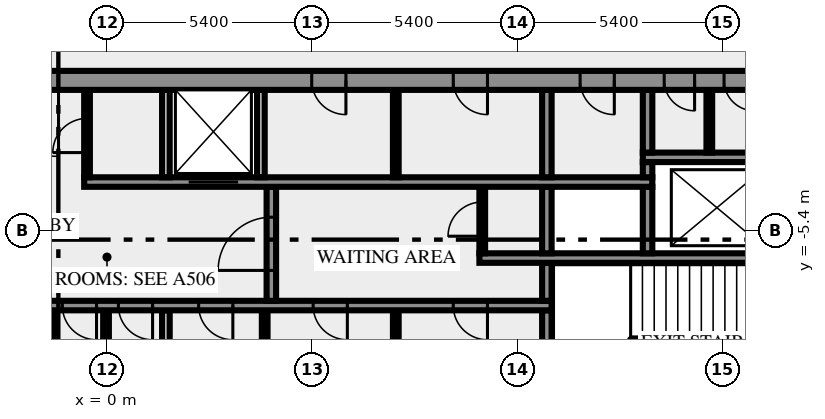
"""IFC4 building model, lengths in metres.
Left out: names, types, materials, properties, quantities, classifications, styles, units other than length and angle.
Written with IfcOpenShell. Run it as: python <this file> out.ifc"""

import sys

from ifc_helpers import new_model, si_unit, direction, frame, frame_2d, origin, place, context, subcontext, project, spatial, rectangle, extrude, element, fill, save


model = new_model("IFC4")
c1 = context("Model", 3, precision=1e-05, world=origin(), true_north=direction((0.0, 1.0)))
c2 = subcontext(c1, "Body", "Model", "MODEL_VIEW")
j1 = project(units=[si_unit("LENGTHUNIT", "METRE"), si_unit("PLANEANGLEUNIT", "RADIAN")], contexts=[c1])
p1 = place(None, origin())
s1 = spatial("IfcSite", under=j1, at=p1, CompositionType="ELEMENT")
p2 = place(p1, origin())
s2 = spatial("IfcBuilding", under=s1, at=p2, CompositionType="ELEMENT")
p3 = place(p2, frame((0.0, 0.0, 257.0)))
s3 = spatial("IfcBuildingStorey", under=s2, at=p3, CompositionType="ELEMENT", Elevation=257.0)
for number, where, z_axis, x_axis in (
    (1, (-1.425, -10.5, 0.0), (0.0, 0.0, 1.0), (0.0, 1.0, 0.0)),
    (2, (-0.025, -10.5, 0.0), (0.0, 0.0, 1.0), (0.0, 1.0, 0.0)),
):
    element("IfcWall", number, at=place(p3, frame(where, z_axis=z_axis, x_axis=x_axis)), inside=s3, PredefinedType="PARTITIONING", context=c2, shape_type="SweptSolid", body=[
        extrude(rectangle(XDim=3.0, YDim=0.15, at=frame_2d((1.5, 0.0))), origin(), (0.0, 0.0, 1.0), 3.65),
    ])
p4 = place(p3, frame((1.55, -10.5, 0.0), z_axis=(0.0, 0.0, 1.0), x_axis=(0.0, 1.0, 0.0)))
e3 = element("IfcWall", 3, at=p4, inside=s3, PredefinedType="SOLIDWALL", context=c2, shape_type="SweptSolid", body=[
    extrude(rectangle(XDim=3.0, YDim=0.2, at=frame_2d((1.5, 0.0))), origin(), (0.0, 0.0, 1.0), 3.65),
])
for number, where, z_axis, x_axis in (
    (4, (4.15, -10.5, 0.0), (0.0, 0.0, 1.0), (0.0, 1.0, 0.0)),
    (5, (7.6, -10.5, 0.0), (0.0, 0.0, 1.0), (0.0, 1.0, 0.0)),
):
    element("IfcWall", number, at=place(p3, frame(where, z_axis=z_axis, x_axis=x_axis)), inside=s3, PredefinedType="PARTITIONING", context=c2, shape_type="SweptSolid", body=[
        extrude(rectangle(XDim=3.0, YDim=0.15, at=frame_2d((1.5, 0.0))), origin(), (0.0, 0.0, 1.0), 3.65),
    ])
p5 = place(p3, frame((11.575, -10.5, 0.0), z_axis=(0.0, 0.0, 1.0), x_axis=(0.0, 1.0, 0.0)))
e6 = element("IfcWall", 6, at=p5, inside=s3, PredefinedType="SHEAR", context=c2, shape_type="SweptSolid", body=[
    extrude(rectangle(XDim=3.0, YDim=0.25, at=frame_2d((1.5, 0.0))), origin(), (0.0, 0.0, 1.0), 3.65),
])
p6 = place(p3, frame((11.7, -7.375, 0.0), z_axis=(0.0, 0.0, 1.0), x_axis=(-1.0, 0.0, 0.0)))
e7 = element("IfcWall", 7, at=p6, inside=s3, PredefinedType="SHEAR", context=c2, shape_type="SweptSolid", body=[
    extrude(rectangle(XDim=23.4, YDim=0.25, at=frame_2d((11.7, 0.0))), origin(), (0.0, 0.0, 1.0), 3.65),
])
p7 = place(p6, frame((22.225, 0.0, 0.0)))
e8 = element("IfcOpeningElement", 8, at=p7, cuts=e7, PredefinedType="OPENING", context=c2, shape_type="SweptSolid", body=[
    extrude(rectangle(XDim=0.8, YDim=2.1, at=frame_2d((0.4, 1.05))), frame((0.0, 0.135, 0.0), z_axis=(0.0, -1.0, 0.0), x_axis=(1.0, 0.0, 0.0)), (0.0, 0.0, 1.0), 0.27),
])
p8 = place(p6, frame((20.2, 0.0, 0.0)))
e9 = element("IfcOpeningElement", 9, at=p8, cuts=e7, PredefinedType="OPENING", context=c2, shape_type="SweptSolid", body=[
    extrude(rectangle(XDim=1.1, YDim=2.1, at=frame_2d((0.55, 1.05))), frame((0.0, 0.135, 0.0), z_axis=(0.0, -1.0, 0.0), x_axis=(1.0, 0.0, 0.0)), (0.0, 0.0, 1.0), 0.27),
])
p9 = place(p6, frame((17.7, 0.0, 0.0)))
e10 = element("IfcOpeningElement", 10, at=p9, cuts=e7, PredefinedType="OPENING", context=c2, shape_type="SweptSolid", body=[
    extrude(rectangle(XDim=1.1, YDim=2.1, at=frame_2d((0.55, 1.05))), frame((0.0, 0.135, 0.0), z_axis=(0.0, -1.0, 0.0), x_axis=(1.0, 0.0, 0.0)), (0.0, 0.0, 1.0), 0.27),
])
p10 = place(p6, frame((15.975, 0.0, 0.0)))
e11 = element("IfcOpeningElement", 11, at=p10, cuts=e7, PredefinedType="OPENING", context=c2, shape_type="SweptSolid", body=[
    extrude(rectangle(XDim=0.8, YDim=2.1, at=frame_2d((0.4, 1.05))), frame((0.0, 0.135, 0.0), z_axis=(0.0, -1.0, 0.0), x_axis=(1.0, 0.0, 0.0)), (0.0, 0.0, 1.0), 0.27),
])
p11 = place(p6, frame((14.75, 0.0, 0.0)))
e12 = element("IfcOpeningElement", 12, at=p11, cuts=e7, PredefinedType="OPENING", context=c2, shape_type="SweptSolid", body=[
    extrude(rectangle(XDim=0.7, YDim=2.1, at=frame_2d((0.35, 1.05))), frame((0.0, 0.135, 0.0), z_axis=(0.0, -1.0, 0.0), x_axis=(1.0, 0.0, 0.0)), (0.0, 0.0, 1.0), 0.27),
])
p12 = place(p6, frame((13.35, 0.0, 0.0)))
e13 = element("IfcOpeningElement", 13, at=p12, cuts=e7, PredefinedType="OPENING", context=c2, shape_type="SweptSolid", body=[
    extrude(rectangle(XDim=0.9, YDim=2.1, at=frame_2d((0.45, 1.05))), frame((0.0, 0.135, 0.0), z_axis=(0.0, -1.0, 0.0), x_axis=(1.0, 0.0, 0.0)), (0.0, 0.0, 1.0), 0.27),
])
p13 = place(p6, frame((11.975, 0.0, 0.0)))
e14 = element("IfcOpeningElement", 14, at=p13, cuts=e7, PredefinedType="OPENING", context=c2, shape_type="SweptSolid", body=[
    extrude(rectangle(XDim=0.9, YDim=2.1, at=frame_2d((0.45, 1.05))), frame((0.0, 0.135, 0.0), z_axis=(0.0, -1.0, 0.0), x_axis=(1.0, 0.0, 0.0)), (0.0, 0.0, 1.0), 0.27),
])
p14 = place(p6, frame((10.5, 0.0, 0.0)))
e15 = element("IfcOpeningElement", 15, at=p14, cuts=e7, PredefinedType="OPENING", context=c2, shape_type="SweptSolid", body=[
    extrude(rectangle(XDim=0.9, YDim=2.1, at=frame_2d((0.45, 1.05))), frame((0.0, 0.135, 0.0), z_axis=(0.0, -1.0, 0.0), x_axis=(1.0, 0.0, 0.0)), (0.0, 0.0, 1.0), 0.27),
])
p15 = place(p6, frame((8.388, 0.0, 0.0)))
e16 = element("IfcOpeningElement", 16, at=p15, cuts=e7, PredefinedType="OPENING", context=c2, shape_type="SweptSolid", body=[
    extrude(rectangle(XDim=0.9, YDim=2.1, at=frame_2d((0.45, 1.05))), frame((0.0, 0.135, 0.0), z_axis=(0.0, -1.0, 0.0), x_axis=(1.0, 0.0, 0.0)), (0.0, 0.0, 1.0), 0.27),
])
p16 = place(p6, frame((5.375, 0.0, 0.0)))
e17 = element("IfcOpeningElement", 17, at=p16, cuts=e7, PredefinedType="OPENING", context=c2, shape_type="SweptSolid", body=[
    extrude(rectangle(XDim=0.9, YDim=2.1, at=frame_2d((0.45, 1.05))), frame((0.0, 0.135, 0.0), z_axis=(0.0, -1.0, 0.0), x_axis=(1.0, 0.0, 0.0)), (0.0, 0.0, 1.0), 0.27),
])
p17 = place(p6, frame((1.688, 0.0, 0.0)))
e18 = element("IfcOpeningElement", 18, at=p17, cuts=e7, PredefinedType="OPENING", context=c2, shape_type="SweptSolid", body=[
    extrude(rectangle(XDim=0.9, YDim=2.1, at=frame_2d((0.45, 1.05))), frame((0.0, 0.135, 0.0), z_axis=(0.0, -1.0, 0.0), x_axis=(1.0, 0.0, 0.0)), (0.0, 0.0, 1.0), 0.27),
])
p18 = place(p3, frame((4.325, -7.25, 0.0), z_axis=(0.0, 0.0, 1.0), x_axis=(0.0, 1.0, 0.0)))
e19 = element("IfcWall", 19, at=p18, inside=s3, PredefinedType="SHEAR", context=c2, shape_type="SweptSolid", body=[
    extrude(rectangle(XDim=3.0, YDim=0.25, at=frame_2d((1.5, 0.0))), origin(), (0.0, 0.0, 1.0), 3.65),
])
p19 = place(p18, frame((0.8, 0.0, 0.0)))
e20 = element("IfcOpeningElement", 20, at=p19, cuts=e19, PredefinedType="OPENING", context=c2, shape_type="SweptSolid", body=[
    extrude(rectangle(XDim=1.4, YDim=2.1, at=frame_2d((0.7, 1.05))), frame((0.0, 0.135, 0.0), z_axis=(0.0, -1.0, 0.0), x_axis=(1.0, 0.0, 0.0)), (0.0, 0.0, 1.0), 0.27),
])
p20 = place(p3, frame((11.575, -7.25, 0.0), z_axis=(0.0, 0.0, 1.0), x_axis=(0.0, 1.0, 0.0)))
e21 = element("IfcWall", 21, at=p20, inside=s3, PredefinedType="SHEAR", context=c2, shape_type="SweptSolid", body=[
    extrude(rectangle(XDim=1.0, YDim=0.25, at=frame_2d((0.5, 0.0))), origin(), (0.0, 0.0, 1.0), 3.65),
])
p21 = place(p3, frame((20.0, -6.125, 0.0), z_axis=(0.0, 0.0, 1.0), x_axis=(-1.0, 0.0, 0.0)))
e22 = element("IfcWall", 22, at=p21, inside=s3, PredefinedType="SHEAR", context=c2, shape_type="SweptSolid", body=[
    extrude(rectangle(XDim=10.2, YDim=0.25, at=frame_2d((5.1, 0.0))), origin(), (0.0, 0.0, 1.0), 3.65),
])
p22 = place(p21, frame((0.55, 0.0, 0.0)))
e23 = element("IfcOpeningElement", 23, at=p22, cuts=e22, PredefinedType="OPENING", context=c2, shape_type="SweptSolid", body=[
    extrude(rectangle(XDim=1.8, YDim=2.1, at=frame_2d((0.9, 1.05))), frame((0.0, 0.135, 0.0), z_axis=(0.0, -1.0, 0.0), x_axis=(1.0, 0.0, 0.0)), (0.0, 0.0, 1.0), 0.27),
])
p23 = place(p3, frame((9.875, -6.0, 0.0), z_axis=(0.0, 0.0, 1.0), x_axis=(0.0, 1.0, 0.0)))
e24 = element("IfcWall", 24, at=p23, inside=s3, PredefinedType="PARTITIONING", context=c2, shape_type="SweptSolid", body=[
    extrude(rectangle(XDim=1.75, YDim=0.15, at=frame_2d((0.875, 0.0))), origin(), (0.0, 0.0, 1.0), 3.65),
])
p24 = place(p23, frame((0.45, 0.0, 0.0)))
e25 = element("IfcOpeningElement", 25, at=p24, cuts=e24, PredefinedType="OPENING", context=c2, shape_type="SweptSolid", body=[
    extrude(rectangle(XDim=0.9, YDim=2.1, at=frame_2d((0.45, 1.05))), frame((0.0, 0.085, 0.0), z_axis=(0.0, -1.0, 0.0), x_axis=(1.0, 0.0, 0.0)), (0.0, 0.0, 1.0), 0.17),
])
for number, where, z_axis, x_axis in (
    (26, (11.575, -6.0, 0.0), (0.0, 0.0, 1.0), (0.0, 1.0, 0.0)),
    (27, (14.225, -6.0, 0.0), (0.0, 0.0, 1.0), (0.0, 1.0, 0.0)),
):
    element("IfcWall", number, at=place(p3, frame(where, z_axis=z_axis, x_axis=x_axis)), inside=s3, PredefinedType="SHEAR", context=c2, shape_type="SweptSolid", body=[
        extrude(rectangle(XDim=1.75, YDim=0.25, at=frame_2d((0.875, 0.0))), origin(), (0.0, 0.0, 1.0), 3.65),
    ])
p25 = place(p3, frame((-0.6, -4.125, 0.0), z_axis=(0.0, 0.0, 1.0), x_axis=(1.0, 0.0, 0.0)))
e28 = element("IfcWall", 28, at=p25, inside=s3, PredefinedType="SHEAR", context=c2, shape_type="SweptSolid", body=[
    extrude(rectangle(XDim=14.95, YDim=0.25, at=frame_2d((7.475, 0.0))), origin(), (0.0, 0.0, 1.0), 3.65),
])
p26 = place(p25, frame((2.75, 0.0, 0.0)))
e29 = element("IfcOpeningElement", 29, at=p26, cuts=e28, PredefinedType="OPENING", context=c2, shape_type="SweptSolid", body=[
    extrude(rectangle(XDim=1.3, YDim=2.1, at=frame_2d((0.65, 1.05))), frame((0.0, 0.135, 0.0), z_axis=(0.0, -1.0, 0.0), x_axis=(1.0, 0.0, 0.0)), (0.0, 0.0, 1.0), 0.27),
])
p27 = place(p3, frame((-0.525, -4.0, 0.0), z_axis=(0.0, 0.0, 1.0), x_axis=(0.0, 1.0, 0.0)))
e30 = element("IfcWall", 30, at=p27, inside=s3, PredefinedType="PARTITIONING", context=c2, shape_type="SweptSolid", body=[
    extrude(rectangle(XDim=2.3, YDim=0.15, at=frame_2d((1.15, 0.0))), origin(), (0.0, 0.0, 1.0), 3.65),
])
p28 = place(p27, frame((0.65, 0.0, 0.0)))
e31 = element("IfcOpeningElement", 31, at=p28, cuts=e30, PredefinedType="OPENING", context=c2, shape_type="SweptSolid", body=[
    extrude(rectangle(XDim=0.9, YDim=2.1, at=frame_2d((0.45, 1.05))), frame((0.0, 0.085, 0.0), z_axis=(0.0, -1.0, 0.0), x_axis=(1.0, 0.0, 0.0)), (0.0, 0.0, 1.0), 0.17),
])
for number, where, z_axis, x_axis in (
    (32, (1.55, -4.0, 0.0), (0.0, 0.0, 1.0), (0.0, 1.0, 0.0)),
    (33, (4.05, -4.0, 0.0), (0.0, 0.0, 1.0), (0.0, 1.0, 0.0)),
):
    element("IfcWall", number, at=place(p3, frame(where, z_axis=z_axis, x_axis=x_axis)), inside=s3, PredefinedType="SOLIDWALL", context=c2, shape_type="SweptSolid", body=[
        extrude(rectangle(XDim=2.3, YDim=0.2, at=frame_2d((1.15, 0.0))), origin(), (0.0, 0.0, 1.0), 3.65),
    ])
p29 = place(p3, frame((7.6, -4.0, 0.0), z_axis=(0.0, 0.0, 1.0), x_axis=(0.0, 1.0, 0.0)))
e34 = element("IfcWall", 34, at=p29, inside=s3, PredefinedType="PARTITIONING", context=c2, shape_type="SweptSolid", body=[
    extrude(rectangle(XDim=2.3, YDim=0.15, at=frame_2d((1.15, 0.0))), origin(), (0.0, 0.0, 1.0), 3.65),
])
p30 = place(p3, frame((11.575, -4.0, 0.0), z_axis=(0.0, 0.0, 1.0), x_axis=(0.0, 1.0, 0.0)))
e35 = element("IfcWall", 35, at=p30, inside=s3, PredefinedType="SHEAR", context=c2, shape_type="SweptSolid", body=[
    extrude(rectangle(XDim=2.3, YDim=0.25, at=frame_2d((1.15, 0.0))), origin(), (0.0, 0.0, 1.0), 3.65),
])
p31 = place(p3, frame((14.225, -4.0, 0.0), z_axis=(0.0, 0.0, 1.0), x_axis=(0.0, 1.0, 0.0)))
e36 = element("IfcWall", 36, at=p31, inside=s3, PredefinedType="SHEAR", context=c2, shape_type="SweptSolid", body=[
    extrude(rectangle(XDim=0.4, YDim=0.25, at=frame_2d((0.2, 0.0))), origin(), (0.0, 0.0, 1.0), 3.65),
])
p32 = place(p3, frame((14.1, -3.475, 0.0), z_axis=(0.0, 0.0, 1.0), x_axis=(1.0, 0.0, 0.0)))
e37 = element("IfcWall", 37, at=p32, inside=s3, PredefinedType="SHEAR", context=c2, shape_type="SweptSolid", body=[
    extrude(rectangle(XDim=3.25, YDim=0.25, at=frame_2d((1.625, 0.0))), origin(), (0.0, 0.0, 1.0), 3.65),
])
p33 = place(p3, frame((14.225, -3.35, 0.0), z_axis=(0.0, 0.0, 1.0), x_axis=(0.0, 1.0, 0.0)))
e38 = element("IfcWall", 38, at=p33, inside=s3, PredefinedType="SHEAR", context=c2, shape_type="SweptSolid", body=[
    extrude(rectangle(XDim=1.65, YDim=0.25, at=frame_2d((0.825, 0.0))), origin(), (0.0, 0.0, 1.0), 3.65),
])
p34 = place(p3, frame((15.85, -3.35, 0.0), z_axis=(0.0, 0.0, 1.0), x_axis=(0.0, 1.0, 0.0)))
e39 = element("IfcWall", 39, at=p34, inside=s3, PredefinedType="PARTITIONING", context=c2, shape_type="SweptSolid", body=[
    extrude(rectangle(XDim=1.65, YDim=0.15, at=frame_2d((0.825, 0.0))), origin(), (0.0, 0.0, 1.0), 3.65),
])
p35 = place(p3, frame((20.49, -1.45, 0.0), z_axis=(0.0, 0.0, 1.0), x_axis=(-1.0, 0.0, 0.0)))
e40 = element("IfcWall", 40, at=p35, inside=s3, PredefinedType="SHEAR", context=c2, shape_type="SweptSolid", body=[
    extrude(rectangle(XDim=40.98, YDim=0.5, at=frame_2d((20.49, 0.0))), origin(), (0.0, 0.0, 1.0), 3.65),
])
p36 = place(p35, frame((38.14, 0.0, 0.0)))
e41 = element("IfcOpeningElement", 41, at=p36, cuts=e40, PredefinedType="OPENING", context=c2, shape_type="SweptSolid", body=[
    extrude(rectangle(XDim=1.8, YDim=2.1, at=frame_2d((0.9, 1.05))), frame((0.0, 0.26, 0.0), z_axis=(0.0, -1.0, 0.0), x_axis=(1.0, 0.0, 0.0)), (0.0, 0.0, 1.0), 0.52),
])
p37 = place(p35, frame((35.89, 0.0, 0.0)))
e42 = element("IfcOpeningElement", 42, at=p37, cuts=e40, PredefinedType="OPENING", context=c2, shape_type="SweptSolid", body=[
    extrude(rectangle(XDim=0.9, YDim=2.1, at=frame_2d((0.45, 1.05))), frame((0.0, 0.26, 0.0), z_axis=(0.0, -1.0, 0.0), x_axis=(1.0, 0.0, 0.0)), (0.0, 0.0, 1.0), 0.52),
])
p38 = place(p35, frame((32.94, 0.0, 0.0)))
e43 = element("IfcOpeningElement", 43, at=p38, cuts=e40, PredefinedType="OPENING", context=c2, shape_type="SweptSolid", body=[
    extrude(rectangle(XDim=0.9, YDim=2.1, at=frame_2d((0.45, 1.05))), frame((0.0, 0.26, 0.0), z_axis=(0.0, -1.0, 0.0), x_axis=(1.0, 0.0, 0.0)), (0.0, 0.0, 1.0), 0.52),
])
p39 = place(p35, frame((31.015, 0.0, 0.0)))
e44 = element("IfcOpeningElement", 44, at=p39, cuts=e40, PredefinedType="OPENING", context=c2, shape_type="SweptSolid", body=[
    extrude(rectangle(XDim=0.8, YDim=2.1, at=frame_2d((0.4, 1.05))), frame((0.0, 0.26, 0.0), z_axis=(0.0, -1.0, 0.0), x_axis=(1.0, 0.0, 0.0)), (0.0, 0.0, 1.0), 0.52),
])
p40 = place(p35, frame((24.765, 0.0, 0.0)))
e45 = element("IfcOpeningElement", 45, at=p40, cuts=e40, PredefinedType="OPENING", context=c2, shape_type="SweptSolid", body=[
    extrude(rectangle(XDim=0.8, YDim=2.1, at=frame_2d((0.4, 1.05))), frame((0.0, 0.26, 0.0), z_axis=(0.0, -1.0, 0.0), x_axis=(1.0, 0.0, 0.0)), (0.0, 0.0, 1.0), 0.52),
])
p41 = place(p35, frame((21.765, 0.0, 0.0)))
e46 = element("IfcOpeningElement", 46, at=p41, cuts=e40, PredefinedType="OPENING", context=c2, shape_type="SweptSolid", body=[
    extrude(rectangle(XDim=2.0, YDim=2.1, at=frame_2d((1.0, 1.05))), frame((0.0, 0.26, 0.0), z_axis=(0.0, -1.0, 0.0), x_axis=(1.0, 0.0, 0.0)), (0.0, 0.0, 1.0), 0.52),
])
p42 = place(p35, frame((14.202, 0.0, 0.0)))
e47 = element("IfcOpeningElement", 47, at=p42, cuts=e40, PredefinedType="OPENING", context=c2, shape_type="SweptSolid", body=[
    extrude(rectangle(XDim=0.9, YDim=2.1, at=frame_2d((0.45, 1.05))), frame((0.0, 0.26, 0.0), z_axis=(0.0, -1.0, 0.0), x_axis=(1.0, 0.0, 0.0)), (0.0, 0.0, 1.0), 0.52),
])
p43 = place(p35, frame((10.478, 0.0, 0.0)))
e48 = element("IfcOpeningElement", 48, at=p43, cuts=e40, PredefinedType="OPENING", context=c2, shape_type="SweptSolid", body=[
    extrude(rectangle(XDim=0.9, YDim=2.1, at=frame_2d((0.45, 1.05))), frame((0.0, 0.26, 0.0), z_axis=(0.0, -1.0, 0.0), x_axis=(1.0, 0.0, 0.0)), (0.0, 0.0, 1.0), 0.52),
])
p44 = place(p35, frame((7.14, 0.0, 0.0)))
e49 = element("IfcOpeningElement", 49, at=p44, cuts=e40, PredefinedType="OPENING", context=c2, shape_type="SweptSolid", body=[
    extrude(rectangle(XDim=0.9, YDim=2.1, at=frame_2d((0.45, 1.05))), frame((0.0, 0.26, 0.0), z_axis=(0.0, -1.0, 0.0), x_axis=(1.0, 0.0, 0.0)), (0.0, 0.0, 1.0), 0.52),
])
p45 = place(p35, frame((5.028, 0.0, 0.0)))
e50 = element("IfcOpeningElement", 50, at=p45, cuts=e40, PredefinedType="OPENING", context=c2, shape_type="SweptSolid", body=[
    extrude(rectangle(XDim=0.8, YDim=2.1, at=frame_2d((0.4, 1.05))), frame((0.0, 0.26, 0.0), z_axis=(0.0, -1.0, 0.0), x_axis=(1.0, 0.0, 0.0)), (0.0, 0.0, 1.0), 0.52),
])
p46 = place(p35, frame((3.452, 0.0, 0.0)))
e51 = element("IfcOpeningElement", 51, at=p46, cuts=e40, PredefinedType="OPENING", context=c2, shape_type="SweptSolid", body=[
    extrude(rectangle(XDim=0.8, YDim=2.1, at=frame_2d((0.4, 1.05))), frame((0.0, 0.26, 0.0), z_axis=(0.0, -1.0, 0.0), x_axis=(1.0, 0.0, 0.0)), (0.0, 0.0, 1.0), 0.52),
])
p47 = place(p35, frame((1.04, 0.0, 0.0)))
e52 = element("IfcOpeningElement", 52, at=p47, cuts=e40, PredefinedType="OPENING", context=c2, shape_type="SweptSolid", body=[
    extrude(rectangle(XDim=1.8, YDim=2.1, at=frame_2d((0.9, 1.05))), frame((0.0, 0.26, 0.0), z_axis=(0.0, -1.0, 0.0), x_axis=(1.0, 0.0, 0.0)), (0.0, 0.0, 1.0), 0.52),
])
p48 = place(p13, origin())
e53 = element("IfcDoor", 53, at=p48, inside=s3, OperationType="SINGLE_SWING_RIGHT", PredefinedType="DOOR", context=c2, shape_type="SweptSolid", body=[
    extrude(rectangle(XDim=0.9, YDim=2.1, at=frame_2d((0.45, 1.05))), frame((0.0, 0.025, 0.0), z_axis=(0.0, -1.0, 0.0), x_axis=(1.0, 0.0, 0.0)), (0.0, 0.0, 1.0), 0.05),
])
fill(e14, e53)
p49 = place(p14, origin())
e54 = element("IfcDoor", 54, at=p49, inside=s3, OperationType="SINGLE_SWING_LEFT", PredefinedType="DOOR", context=c2, shape_type="SweptSolid", body=[
    extrude(rectangle(XDim=0.9, YDim=2.1, at=frame_2d((0.45, 1.05))), frame((0.0, 0.025, 0.0), z_axis=(0.0, -1.0, 0.0), x_axis=(1.0, 0.0, 0.0)), (0.0, 0.0, 1.0), 0.05),
])
fill(e15, e54)
p50 = place(p15, origin())
e55 = element("IfcDoor", 55, at=p50, inside=s3, OperationType="SINGLE_SWING_LEFT", PredefinedType="DOOR", context=c2, shape_type="SweptSolid", body=[
    extrude(rectangle(XDim=0.9, YDim=2.1, at=frame_2d((0.45, 1.05))), frame((0.0, 0.025, 0.0), z_axis=(0.0, -1.0, 0.0), x_axis=(1.0, 0.0, 0.0)), (0.0, 0.0, 1.0), 0.05),
])
fill(e16, e55)
p51 = place(p16, origin())
e56 = element("IfcDoor", 56, at=p51, inside=s3, OperationType="SINGLE_SWING_LEFT", PredefinedType="DOOR", context=c2, shape_type="SweptSolid", body=[
    extrude(rectangle(XDim=0.9, YDim=2.1, at=frame_2d((0.45, 1.05))), frame((0.0, 0.025, 0.0), z_axis=(0.0, -1.0, 0.0), x_axis=(1.0, 0.0, 0.0)), (0.0, 0.0, 1.0), 0.05),
])
fill(e17, e56)
p52 = place(p17, origin())
e57 = element("IfcDoor", 57, at=p52, inside=s3, OperationType="SINGLE_SWING_LEFT", PredefinedType="DOOR", context=c2, shape_type="SweptSolid", body=[
    extrude(rectangle(XDim=0.9, YDim=2.1, at=frame_2d((0.45, 1.05))), frame((0.0, 0.025, 0.0), z_axis=(0.0, -1.0, 0.0), x_axis=(1.0, 0.0, 0.0)), (0.0, 0.0, 1.0), 0.05),
])
fill(e18, e57)
p53 = place(p19, origin())
e58 = element("IfcDoor", 58, at=p53, inside=s3, OperationType="DOUBLE_DOOR_SINGLE_SWING", PredefinedType="DOOR", context=c2, shape_type="SweptSolid", body=[
    extrude(rectangle(XDim=1.4, YDim=2.1, at=frame_2d((0.7, 1.05))), frame((0.0, 0.025, 0.0), z_axis=(0.0, -1.0, 0.0), x_axis=(1.0, 0.0, 0.0)), (0.0, 0.0, 1.0), 0.05),
])
fill(e20, e58)
p54 = place(p24, origin())
e59 = element("IfcDoor", 59, at=p54, inside=s3, OperationType="SINGLE_SWING_RIGHT", PredefinedType="DOOR", context=c2, shape_type="SweptSolid", body=[
    extrude(rectangle(XDim=0.9, YDim=2.1, at=frame_2d((0.45, 1.05))), frame((0.0, 0.025, 0.0), z_axis=(0.0, -1.0, 0.0), x_axis=(1.0, 0.0, 0.0)), (0.0, 0.0, 1.0), 0.05),
])
fill(e25, e59)
p55 = place(p26, origin())
e60 = element("IfcDoor", 60, at=p55, inside=s3, OperationType="DOUBLE_DOOR_SLIDING", PredefinedType="DOOR", context=c2, shape_type="SweptSolid", body=[
    extrude(rectangle(XDim=1.3, YDim=2.1, at=frame_2d((0.65, 1.05))), frame((0.0, 0.025, 0.0), z_axis=(0.0, -1.0, 0.0), x_axis=(1.0, 0.0, 0.0)), (0.0, 0.0, 1.0), 0.05),
])
fill(e29, e60)
p56 = place(p28, origin())
e61 = element("IfcDoor", 61, at=p56, inside=s3, OperationType="SINGLE_SWING_LEFT", PredefinedType="DOOR", context=c2, shape_type="SweptSolid", body=[
    extrude(rectangle(XDim=0.9, YDim=2.1, at=frame_2d((0.45, 1.05))), frame((0.0, 0.025, 0.0), z_axis=(0.0, -1.0, 0.0), x_axis=(1.0, 0.0, 0.0)), (0.0, 0.0, 1.0), 0.05),
])
fill(e31, e61)
p57 = place(p41, origin())
e62 = element("IfcDoor", 62, at=p57, inside=s3, OperationType="DOUBLE_DOOR_SINGLE_SWING", PredefinedType="DOOR", context=c2, shape_type="SweptSolid", body=[
    extrude(rectangle(XDim=2.0, YDim=2.1, at=frame_2d((1.0, 1.05))), frame((0.0, 0.025, 0.0), z_axis=(0.0, -1.0, 0.0), x_axis=(1.0, 0.0, 0.0)), (0.0, 0.0, 1.0), 0.05),
])
fill(e46, e62)
p58 = place(p42, origin())
e63 = element("IfcDoor", 63, at=p58, inside=s3, OperationType="SINGLE_SWING_LEFT", PredefinedType="DOOR", context=c2, shape_type="SweptSolid", body=[
    extrude(rectangle(XDim=0.9, YDim=2.1, at=frame_2d((0.45, 1.05))), frame((0.0, 0.025, 0.0), z_axis=(0.0, -1.0, 0.0), x_axis=(1.0, 0.0, 0.0)), (0.0, 0.0, 1.0), 0.05),
])
fill(e47, e63)
p59 = place(p43, origin())
e64 = element("IfcDoor", 64, at=p59, inside=s3, OperationType="SINGLE_SWING_LEFT", PredefinedType="DOOR", context=c2, shape_type="SweptSolid", body=[
    extrude(rectangle(XDim=0.9, YDim=2.1, at=frame_2d((0.45, 1.05))), frame((0.0, 0.025, 0.0), z_axis=(0.0, -1.0, 0.0), x_axis=(1.0, 0.0, 0.0)), (0.0, 0.0, 1.0), 0.05),
])
fill(e48, e64)
p60 = place(p44, origin())
e65 = element("IfcDoor", 65, at=p60, inside=s3, OperationType="SINGLE_SWING_LEFT", PredefinedType="DOOR", context=c2, shape_type="SweptSolid", body=[
    extrude(rectangle(XDim=0.9, YDim=2.1, at=frame_2d((0.45, 1.05))), frame((0.0, 0.025, 0.0), z_axis=(0.0, -1.0, 0.0), x_axis=(1.0, 0.0, 0.0)), (0.0, 0.0, 1.0), 0.05),
])
fill(e49, e65)
p61 = place(p45, origin())
e66 = element("IfcDoor", 66, at=p61, inside=s3, OperationType="SINGLE_SWING_LEFT", PredefinedType="DOOR", context=c2, shape_type="SweptSolid", body=[
    extrude(rectangle(XDim=0.8, YDim=2.1, at=frame_2d((0.4, 1.05))), frame((0.0, 0.025, 0.0), z_axis=(0.0, -1.0, 0.0), x_axis=(1.0, 0.0, 0.0)), (0.0, 0.0, 1.0), 0.05),
])
fill(e50, e66)
p62 = place(p46, origin())
e67 = element("IfcDoor", 67, at=p62, inside=s3, OperationType="SINGLE_SWING_LEFT", PredefinedType="DOOR", context=c2, shape_type="SweptSolid", body=[
    extrude(rectangle(XDim=0.8, YDim=2.1, at=frame_2d((0.4, 1.05))), frame((0.0, 0.025, 0.0), z_axis=(0.0, -1.0, 0.0), x_axis=(1.0, 0.0, 0.0)), (0.0, 0.0, 1.0), 0.05),
])
fill(e51, e67)
save(model, sys.argv[1])
